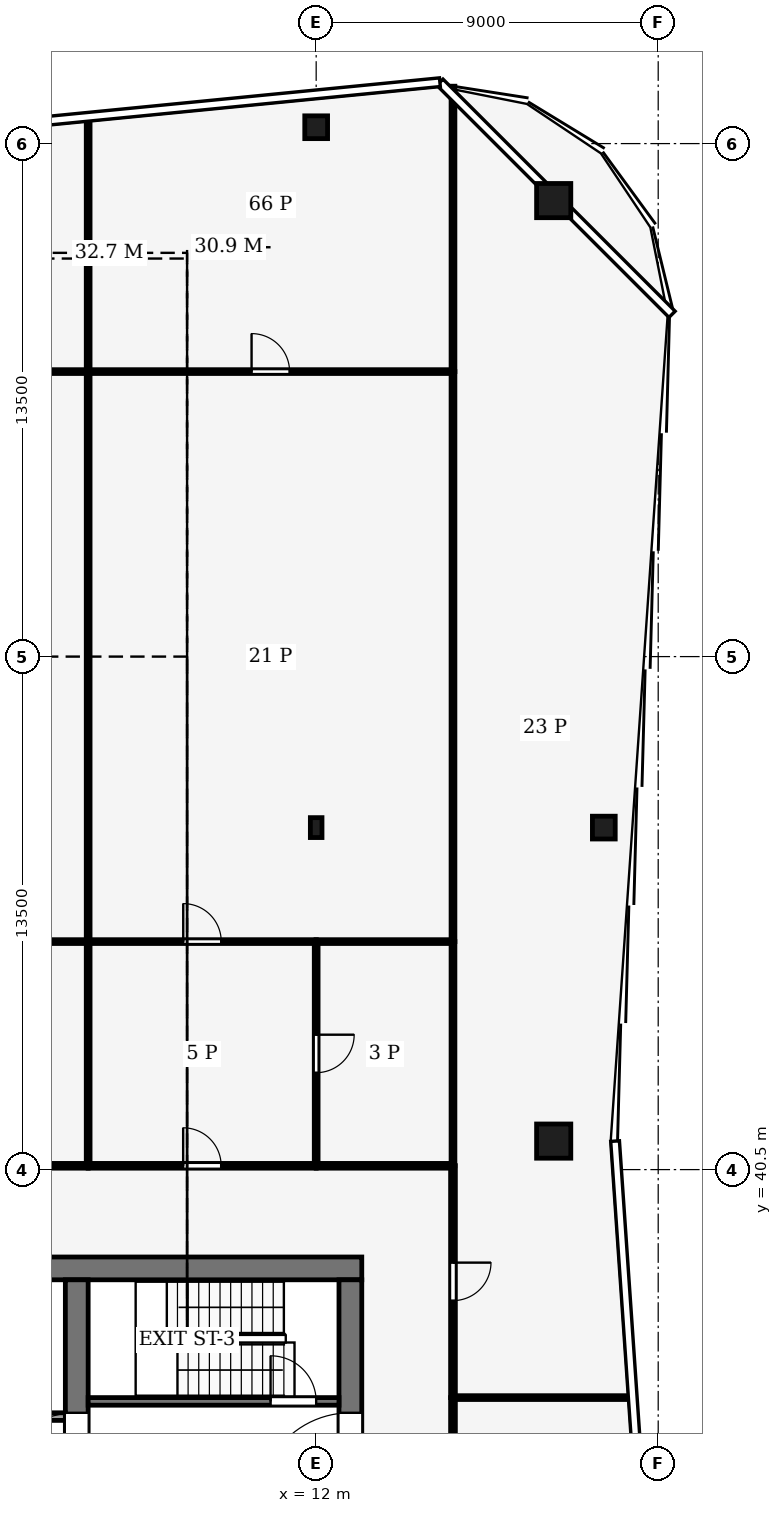
"""IFC4 building model, lengths in metres.
Left out: names, types, materials, properties, quantities, classifications, styles, units other than length and angle.
Written with IfcOpenShell. Run it as: python <this file> out.ifc"""

import sys

from ifc_helpers import new_model, si_unit, direction, frame, frame_2d, origin, origin_2d, place, context, subcontext, project, spatial, rectangle, hollow_rectangle, i_section, extrude, element, fill, save


model = new_model("IFC4")
c1 = context("Model", 3, precision=1e-05, world=origin(), true_north=direction((0.0, 1.0)))
c2 = subcontext(c1, "Body", "Model", "MODEL_VIEW")
j1 = project(units=[si_unit("LENGTHUNIT", "METRE"), si_unit("PLANEANGLEUNIT", "RADIAN")], contexts=[c1])
p1 = place(None, origin())
s1 = spatial("IfcSite", under=j1, at=p1, CompositionType="ELEMENT")
p2 = place(p1, origin())
s2 = spatial("IfcBuilding", under=s1, at=p2, CompositionType="ELEMENT")
p3 = place(p2, frame((0.0, 0.0, 314.0)))
s3 = spatial("IfcBuildingStorey", under=s2, at=p3, CompositionType="ELEMENT", Elevation=314.0)
p4 = place(p3, frame((-13.2, 37.9, -0.13), z_axis=(0.0, 0.0, 1.0), x_axis=(1.0, 0.0, 0.0)))
e1 = element("IfcWall", 1, at=p4, inside=s3, PredefinedType="SHEAR", context=c2, shape_type="SweptSolid", body=[
    extrude(rectangle(XDim=26.4, YDim=0.6, at=frame_2d((13.2, 0.0))), origin(), (0.0, 0.0, 1.0), 4.0),
])
p5 = place(p3, frame((12.9, 18.4, -0.13), z_axis=(0.0, 0.0, 1.0), x_axis=(0.0, 1.0, 0.0)))
e2 = element("IfcWall", 2, at=p5, inside=s3, PredefinedType="SHEAR", context=c2, shape_type="SweptSolid", body=[
    extrude(rectangle(XDim=19.2, YDim=0.6, at=frame_2d((9.6, 0.0))), origin(), (0.0, 0.0, 1.0), 4.0),
])
p6 = place(p5, frame((2.8, 0.0, 0.13)))
e3 = element("IfcOpeningElement", 3, at=p6, cuts=e2, PredefinedType="OPENING", context=c2, shape_type="SweptSolid", body=[
    extrude(rectangle(XDim=2.4, YDim=2.4, at=frame_2d((1.2, 1.2))), frame((0.0, 0.31, 0.0), z_axis=(0.0, -1.0, 0.0), x_axis=(1.0, 0.0, 0.0)), (0.0, 0.0, 1.0), 0.62),
])
p7 = place(p5, frame((13.3, 0.0, 0.13)))
e4 = element("IfcOpeningElement", 4, at=p7, cuts=e2, PredefinedType="OPENING", context=c2, shape_type="SweptSolid", body=[
    extrude(rectangle(XDim=2.4, YDim=2.4, at=frame_2d((1.2, 1.2))), frame((0.0, 0.31, 0.0), z_axis=(0.0, -1.0, 0.0), x_axis=(1.0, 0.0, 0.0)), (0.0, 0.0, 1.0), 0.62),
])
p8 = place(p3, frame((5.7, 18.4, -0.13), z_axis=(0.0, 0.0, 1.0), x_axis=(0.0, 1.0, 0.0)))
e5 = element("IfcWall", 5, at=p8, inside=s3, PredefinedType="SHEAR", context=c2, shape_type="SweptSolid", body=[
    extrude(rectangle(XDim=19.2, YDim=0.6, at=frame_2d((9.6, 0.0))), origin(), (0.0, 0.0, 1.0), 4.0),
])
p9 = place(p8, frame((8.35, 0.0, 0.13)))
e6 = element("IfcOpeningElement", 6, at=p9, cuts=e5, PredefinedType="OPENING", context=c2, shape_type="SweptSolid", body=[
    extrude(rectangle(XDim=0.9, YDim=2.1, at=frame_2d((0.45, 1.05))), frame((0.0, 0.31, 0.0), z_axis=(0.0, -1.0, 0.0), x_axis=(1.0, 0.0, 0.0)), (0.0, 0.0, 1.0), 0.62),
])
p10 = place(p8, frame((13.3, 0.0, 0.13)))
e7 = element("IfcOpeningElement", 7, at=p10, cuts=e5, PredefinedType="OPENING", context=c2, shape_type="SweptSolid", body=[
    extrude(rectangle(XDim=2.4, YDim=2.4, at=frame_2d((1.2, 1.2))), frame((0.0, 0.31, 0.0), z_axis=(0.0, -1.0, 0.0), x_axis=(1.0, 0.0, 0.0)), (0.0, 0.0, 1.0), 0.62),
])
for number, where, z_axis, x_axis in (
    (8, (18.25, 66.0, 0.0), (0.0, 0.0, 1.0), (1.0, 0.0, 0.0)),
    (9, (18.25, 41.25, 0.0), (0.0, 0.0, 1.0), (1.0, 0.0, 0.0)),
):
    element("IfcColumn", number, at=place(p3, frame(where, z_axis=z_axis, x_axis=x_axis)), inside=s3, PredefinedType="COLUMN", context=c2, shape_type="SweptSolid", body=[
        extrude(hollow_rectangle(XDim=0.9, YDim=0.9, WallThickness=0.04, at=origin_2d()), origin(), (0.0, 0.0, 1.0), 4.0),
    ])
for number, where, z_axis, x_axis in (
    (10, (12.0, 67.93, 0.0), (0.0, 0.0, 1.0), (1.0, 0.0, 0.0)),
    (11, (19.569, 49.5, 0.0), (0.0, 0.0, 1.0), (1.0, 0.0, 0.0)),
):
    element("IfcColumn", number, at=place(p3, frame(where, z_axis=z_axis, x_axis=x_axis)), inside=s3, PredefinedType="COLUMN", context=c2, shape_type="SweptSolid", body=[
        extrude(hollow_rectangle(XDim=0.6, YDim=0.6, WallThickness=0.025, at=origin_2d()), origin(), (0.0, 0.0, 1.0), 4.0),
    ])
p11 = place(p3, frame((12.0, 49.5, 0.0), z_axis=(0.0, 0.0, 1.0), x_axis=(1.0, 0.0, 0.0)))
e12 = element("IfcColumn", 12, at=p11, inside=s3, PredefinedType="COLUMN", context=c2, shape_type="SweptSolid", body=[
    extrude(i_section(OverallWidth=0.306, OverallDepth=0.524, WebThickness=0.012, FlangeThickness=0.04, FilletRadius=0.027, at=origin_2d()), origin(), (0.0, 0.0, 1.0), 4.0),
])
p12 = place(p3, frame((-5.4, 34.0, 0.0), z_axis=(0.0, 0.0, 1.0), x_axis=(1.0, 0.0, 0.0)))
e13 = element("IfcWall", 13, at=p12, inside=s3, PredefinedType="PARTITIONING", context=c2, shape_type="SweptSolid", body=[
    extrude(rectangle(XDim=10.8, YDim=0.2, at=frame_2d((5.4, 0.0))), origin(), (0.0, 0.0, 1.0), 3.87),
])
p13 = place(p12, frame((6.15, 0.0, 0.0)))
e14 = element("IfcOpeningElement", 14, at=p13, cuts=e13, PredefinedType="OPENING", context=c2, shape_type="SweptSolid", body=[
    extrude(rectangle(XDim=1.2, YDim=2.2, at=frame_2d((0.6, 1.1))), frame((0.0, 0.11, 0.0), z_axis=(0.0, -1.0, 0.0), x_axis=(1.0, 0.0, 0.0)), (0.0, 0.0, 1.0), 0.22),
])
p14 = place(p12, frame((8.95, 0.0, 0.0)))
e15 = element("IfcOpeningElement", 15, at=p14, cuts=e13, PredefinedType="OPENING", context=c2, shape_type="SweptSolid", body=[
    extrude(rectangle(XDim=1.0, YDim=2.1, at=frame_2d((0.5, 1.05))), frame((0.0, 0.11, 0.0), z_axis=(0.0, -1.0, 0.0), x_axis=(1.0, 0.0, 0.0)), (0.0, 0.0, 1.0), 0.22),
])
p15 = place(p3, frame((6.0, 34.4, 0.0), z_axis=(0.0, 0.0, 1.0), x_axis=(1.0, 0.0, 0.0)))
e16 = element("IfcWall", 16, at=p15, inside=s3, PredefinedType="PARTITIONING", context=c2, shape_type="SweptSolid", body=[
    extrude(rectangle(XDim=6.6, YDim=0.2, at=frame_2d((3.3, 0.0))), origin(), (0.0, 0.0, 1.0), 3.87),
])
p16 = place(p15, frame((4.8, 0.0, 0.0)))
e17 = element("IfcOpeningElement", 17, at=p16, cuts=e16, PredefinedType="OPENING", context=c2, shape_type="SweptSolid", body=[
    extrude(rectangle(XDim=1.2, YDim=2.2, at=frame_2d((0.6, 1.1))), frame((0.0, 0.11, 0.0), z_axis=(0.0, -1.0, 0.0), x_axis=(1.0, 0.0, 0.0)), (0.0, 0.0, 1.0), 0.22),
])
p17 = place(p3, frame((15.6, 34.5, 0.0), z_axis=(0.0, 0.0, 1.0), x_axis=(0.0, -1.0, 0.0)))
e18 = element("IfcWall", 18, at=p17, inside=s3, PredefinedType="PARTITIONING", context=c2, shape_type="SweptSolid", body=[
    extrude(rectangle(XDim=3.0, YDim=0.125, at=frame_2d((1.5, 0.0))), origin(), (0.0, 0.0, 1.0), 3.54),
])
p18 = place(p17, frame((1.05, 0.0, 0.0)))
e19 = element("IfcOpeningElement", 19, at=p18, cuts=e18, PredefinedType="OPENING", context=c2, shape_type="SweptSolid", body=[
    extrude(rectangle(XDim=0.9, YDim=2.1, at=frame_2d((0.45, 1.05))), frame((0.0, 0.073, 0.0), z_axis=(0.0, -1.0, 0.0), x_axis=(1.0, 0.0, 0.0)), (0.0, 0.0, 1.0), 0.145),
])
p19 = place(p3, frame((15.6, 40.604, 0.0), z_axis=(0.0, 0.0, 1.0), x_axis=(0.0, -1.0, 0.0)))
e20 = element("IfcWall", 20, at=p19, inside=s3, PredefinedType="PARTITIONING", context=c2, shape_type="SweptSolid", body=[
    extrude(rectangle(XDim=6.104, YDim=0.125, at=frame_2d((3.052, 0.0))), origin(), (0.0, 0.0, 1.0), 3.14),
])
p20 = place(p19, frame((2.552, 0.0, 0.0)))
e21 = element("IfcOpeningElement", 21, at=p20, cuts=e20, PredefinedType="OPENING", context=c2, shape_type="SweptSolid", body=[
    extrude(rectangle(XDim=1.0, YDim=2.1, at=frame_2d((0.5, 1.05))), frame((0.0, 0.073, 0.0), z_axis=(0.0, -1.0, 0.0), x_axis=(1.0, 0.0, 0.0)), (0.0, 0.0, 1.0), 0.145),
])
p21 = place(p3, frame((-3.0, 40.6, 0.0), z_axis=(0.0, 0.0, 1.0), x_axis=(1.0, 0.0, 0.0)))
e22 = element("IfcWall", 22, at=p21, inside=s3, PredefinedType="PARTITIONING", context=c2, shape_type="SweptSolid", body=[
    extrude(rectangle(XDim=9.0, YDim=0.125, at=frame_2d((4.5, 0.0))), origin(), (0.0, 0.0, 1.0), 3.39),
])
p22 = place(p21, frame((4.0, 0.0, 0.0)))
e23 = element("IfcOpeningElement", 23, at=p22, cuts=e22, PredefinedType="OPENING", context=c2, shape_type="SweptSolid", body=[
    extrude(rectangle(XDim=1.0, YDim=2.1, at=frame_2d((0.5, 1.05))), frame((0.0, 0.073, 0.0), z_axis=(0.0, -1.0, 0.0), x_axis=(1.0, 0.0, 0.0)), (0.0, 0.0, 1.0), 0.145),
])
p23 = place(p3, frame((6.0, 40.6, 0.0), z_axis=(0.0, 0.0, 1.0), x_axis=(1.0, 0.0, 0.0)))
e24 = element("IfcWall", 24, at=p23, inside=s3, PredefinedType="PARTITIONING", context=c2, shape_type="SweptSolid", body=[
    extrude(rectangle(XDim=6.0, YDim=0.125, at=frame_2d((3.0, 0.0))), origin(), (0.0, 0.0, 1.0), 3.39),
])
p24 = place(p23, frame((2.5, 0.0, 0.0)))
e25 = element("IfcOpeningElement", 25, at=p24, cuts=e24, PredefinedType="OPENING", context=c2, shape_type="SweptSolid", body=[
    extrude(rectangle(XDim=1.0, YDim=2.1, at=frame_2d((0.5, 1.05))), frame((0.0, 0.073, 0.0), z_axis=(0.0, -1.0, 0.0), x_axis=(1.0, 0.0, 0.0)), (0.0, 0.0, 1.0), 0.145),
])
p25 = place(p3, frame((15.6, 40.6, 0.0), z_axis=(0.0, 0.0, 1.0), x_axis=(-1.0, 0.0, 0.0)))
e26 = element("IfcWall", 26, at=p25, inside=s3, PredefinedType="PARTITIONING", context=c2, shape_type="SweptSolid", body=[
    extrude(rectangle(XDim=3.6, YDim=0.125, at=frame_2d((1.8, 0.0))), origin(), (0.0, 0.0, 1.0), 3.39),
])
p26 = place(p3, frame((20.295, 34.5, 0.0), z_axis=(0.0, 0.0, 1.0), x_axis=(-1.0, 0.0, 0.0)))
e27 = element("IfcWall", 27, at=p26, inside=s3, PredefinedType="PARTITIONING", context=c2, shape_type="SweptSolid", body=[
    extrude(rectangle(XDim=4.695, YDim=0.1, at=frame_2d((2.348, 0.0))), origin(), (0.0, 0.0, 1.0), 3.04),
])
p27 = place(p3, frame((15.6, 46.5, 0.0), z_axis=(0.0, 0.0, 1.0), x_axis=(0.0, -1.0, 0.0)))
e28 = element("IfcWall", 28, at=p27, inside=s3, PredefinedType="PARTITIONING", context=c2, shape_type="SweptSolid", body=[
    extrude(rectangle(XDim=5.9, YDim=0.1, at=frame_2d((2.95, 0.0))), origin(), (0.0, 0.0, 1.0), 3.87),
])
p28 = place(p3, frame((15.6, 61.5, 0.0), z_axis=(0.0, 0.0, 1.0), x_axis=(0.0, -1.0, 0.0)))
e29 = element("IfcWall", 29, at=p28, inside=s3, PredefinedType="PARTITIONING", context=c2, shape_type="SweptSolid", body=[
    extrude(rectangle(XDim=15.0, YDim=0.1, at=frame_2d((7.5, 0.0))), origin(), (0.0, 0.0, 1.0), 3.35),
])
p29 = place(p3, frame((15.6, 69.01, 0.0), z_axis=(0.0, 0.0, 1.0), x_axis=(0.0, -1.0, 0.0)))
e30 = element("IfcWall", 30, at=p29, inside=s3, PredefinedType="PARTITIONING", context=c2, shape_type="SweptSolid", body=[
    extrude(rectangle(XDim=7.51, YDim=0.1, at=frame_2d((3.755, 0.0))), origin(), (0.0, 0.0, 1.0), 2.93),
])
p30 = place(p3, frame((6.0, 46.5, 0.0), z_axis=(0.0, 0.0, 1.0), x_axis=(-1.0, 0.0, 0.0)))
e31 = element("IfcWall", 31, at=p30, inside=s3, PredefinedType="PARTITIONING", context=c2, shape_type="SweptSolid", body=[
    extrude(rectangle(XDim=9.004, YDim=0.1, at=frame_2d((4.502, 0.0))), origin(), (0.0, 0.0, 1.0), 3.39),
])
p31 = place(p3, frame((6.0, 40.6, 0.0), z_axis=(0.0, 0.0, 1.0), x_axis=(0.0, 1.0, 0.0)))
e32 = element("IfcWall", 32, at=p31, inside=s3, PredefinedType="PARTITIONING", context=c2, shape_type="SweptSolid", body=[
    extrude(rectangle(XDim=5.9, YDim=0.1, at=frame_2d((2.95, 0.0))), origin(), (0.0, 0.0, 1.0), 3.87),
])
p32 = place(p3, frame((3.0, 61.5, 0.0), z_axis=(0.0, 0.0, 1.0), x_axis=(1.0, 0.0, 0.0)))
e33 = element("IfcWall", 33, at=p32, inside=s3, PredefinedType="PARTITIONING", context=c2, shape_type="SweptSolid", body=[
    extrude(rectangle(XDim=3.0, YDim=0.1, at=frame_2d((1.5, 0.0))), origin(), (0.0, 0.0, 1.0), 3.24),
])
p33 = place(p32, frame((1.0, 0.0, 0.0)))
e34 = element("IfcOpeningElement", 34, at=p33, cuts=e33, PredefinedType="OPENING", context=c2, shape_type="SweptSolid", body=[
    extrude(rectangle(XDim=1.0, YDim=2.1, at=frame_2d((0.5, 1.05))), frame((0.0, 0.06, 0.0), z_axis=(0.0, -1.0, 0.0), x_axis=(1.0, 0.0, 0.0)), (0.0, 0.0, 1.0), 0.12),
])
p34 = place(p3, frame((6.0, 46.5, 0.0), z_axis=(0.0, 0.0, 1.0), x_axis=(0.0, 1.0, 0.0)))
e35 = element("IfcWall", 35, at=p34, inside=s3, PredefinedType="PARTITIONING", context=c2, shape_type="SweptSolid", body=[
    extrude(rectangle(XDim=15.0, YDim=0.1, at=frame_2d((7.5, 0.0))), origin(), (0.0, 0.0, 1.0), 3.24),
])
p35 = place(p3, frame((6.0, 61.5, 0.0), z_axis=(0.0, 0.0, 1.0), x_axis=(0.0, 1.0, 0.0)))
e36 = element("IfcWall", 36, at=p35, inside=s3, PredefinedType="PARTITIONING", context=c2, shape_type="SweptSolid", body=[
    extrude(rectangle(XDim=6.67, YDim=0.1, at=frame_2d((3.335, 0.0))), origin(), (0.0, 0.0, 1.0), 3.04),
])
p36 = place(p3, frame((12.0, 46.5, 0.0), z_axis=(0.0, 0.0, 1.0), x_axis=(0.0, -1.0, 0.0)))
e37 = element("IfcWall", 37, at=p36, inside=s3, PredefinedType="PARTITIONING", context=c2, shape_type="SweptSolid", body=[
    extrude(rectangle(XDim=5.9, YDim=0.1, at=frame_2d((2.95, 0.0))), origin(), (0.0, 0.0, 1.0), 3.39),
])
p37 = place(p36, frame((2.45, 0.0, 0.0)))
e38 = element("IfcOpeningElement", 38, at=p37, cuts=e37, PredefinedType="OPENING", context=c2, shape_type="SweptSolid", body=[
    extrude(rectangle(XDim=1.0, YDim=2.1, at=frame_2d((0.5, 1.05))), frame((0.0, 0.06, 0.0), z_axis=(0.0, -1.0, 0.0), x_axis=(1.0, 0.0, 0.0)), (0.0, 0.0, 1.0), 0.12),
])
p38 = place(p3, frame((6.0, 46.5, 0.0), z_axis=(0.0, 0.0, 1.0), x_axis=(1.0, 0.0, 0.0)))
e39 = element("IfcWall", 39, at=p38, inside=s3, PredefinedType="PARTITIONING", context=c2, shape_type="SweptSolid", body=[
    extrude(rectangle(XDim=6.004, YDim=0.1, at=frame_2d((3.002, 0.0))), origin(), (0.0, 0.0, 1.0), 3.39),
])
p39 = place(p38, frame((2.502, 0.0, 0.0)))
e40 = element("IfcOpeningElement", 40, at=p39, cuts=e39, PredefinedType="OPENING", context=c2, shape_type="SweptSolid", body=[
    extrude(rectangle(XDim=1.0, YDim=2.1, at=frame_2d((0.5, 1.05))), frame((0.0, 0.06, 0.0), z_axis=(0.0, -1.0, 0.0), x_axis=(1.0, 0.0, 0.0)), (0.0, 0.0, 1.0), 0.12),
])
p40 = place(p3, frame((15.6, 46.5, 0.0), z_axis=(0.0, 0.0, 1.0), x_axis=(-1.0, 0.0, 0.0)))
e41 = element("IfcWall", 41, at=p40, inside=s3, PredefinedType="PARTITIONING", context=c2, shape_type="SweptSolid", body=[
    extrude(rectangle(XDim=3.604, YDim=0.1, at=frame_2d((1.802, 0.0))), origin(), (0.0, 0.0, 1.0), 3.87),
])
p41 = place(p3, frame((6.0, 61.5, 0.0), z_axis=(0.0, 0.0, 1.0), x_axis=(1.0, 0.0, 0.0)))
e42 = element("IfcWall", 42, at=p41, inside=s3, PredefinedType="PARTITIONING", context=c2, shape_type="SweptSolid", body=[
    extrude(rectangle(XDim=9.6, YDim=0.1, at=frame_2d((4.8, 0.0))), origin(), (0.0, 0.0, 1.0), 3.24),
])
p42 = place(p41, frame((4.3, 0.0, 0.0)))
e43 = element("IfcOpeningElement", 43, at=p42, cuts=e42, PredefinedType="OPENING", context=c2, shape_type="SweptSolid", body=[
    extrude(rectangle(XDim=1.0, YDim=2.1, at=frame_2d((0.5, 1.05))), frame((0.0, 0.06, 0.0), z_axis=(0.0, -1.0, 0.0), x_axis=(1.0, 0.0, 0.0)), (0.0, 0.0, 1.0), 0.12),
])
p43 = place(p16, origin())
e44 = element("IfcDoor", 44, at=p43, inside=s3, OperationType="SINGLE_SWING_RIGHT", PredefinedType="DOOR", context=c2, shape_type="SweptSolid", body=[
    extrude(rectangle(XDim=1.2, YDim=2.2, at=frame_2d((0.6, 1.1))), frame((0.0, 0.025, 0.0), z_axis=(0.0, -1.0, 0.0), x_axis=(1.0, 0.0, 0.0)), (0.0, 0.0, 1.0), 0.05),
])
fill(e17, e44)
p44 = place(p10, origin())
e45 = element("IfcDoor", 45, at=p44, inside=s3, OperationType="DOUBLE_DOOR_SINGLE_SWING", PredefinedType="DOOR", context=c2, shape_type="SweptSolid", body=[
    extrude(rectangle(XDim=2.4, YDim=2.4, at=frame_2d((1.2, 1.2))), frame((0.0, 0.025, 0.0), z_axis=(0.0, -1.0, 0.0), x_axis=(1.0, 0.0, 0.0)), (0.0, 0.0, 1.0), 0.05),
])
fill(e7, e45)
p45 = place(p7, origin())
e46 = element("IfcDoor", 46, at=p45, inside=s3, OperationType="DOUBLE_DOOR_SINGLE_SWING", PredefinedType="DOOR", context=c2, shape_type="SweptSolid", body=[
    extrude(rectangle(XDim=2.4, YDim=2.4, at=frame_2d((1.2, 1.2))), frame((0.0, 0.025, 0.0), z_axis=(0.0, -1.0, 0.0), x_axis=(1.0, 0.0, 0.0)), (0.0, 0.0, 1.0), 0.05),
])
fill(e4, e46)
p46 = place(p20, origin())
e47 = element("IfcDoor", 47, at=p46, inside=s3, OperationType="SINGLE_SWING_LEFT", PredefinedType="DOOR", context=c2, shape_type="SweptSolid", body=[
    extrude(rectangle(XDim=1.0, YDim=2.1, at=frame_2d((0.5, 1.05))), frame((0.0, 0.025, 0.0), z_axis=(0.0, -1.0, 0.0), x_axis=(1.0, 0.0, 0.0)), (0.0, 0.0, 1.0), 0.05),
])
fill(e21, e47)
p47 = place(p24, origin())
e48 = element("IfcDoor", 48, at=p47, inside=s3, OperationType="SINGLE_SWING_RIGHT", PredefinedType="DOOR", context=c2, shape_type="SweptSolid", body=[
    extrude(rectangle(XDim=1.0, YDim=2.1, at=frame_2d((0.5, 1.05))), frame((0.0, 0.025, 0.0), z_axis=(0.0, -1.0, 0.0), x_axis=(1.0, 0.0, 0.0)), (0.0, 0.0, 1.0), 0.05),
])
fill(e25, e48)
p48 = place(p37, origin())
e49 = element("IfcDoor", 49, at=p48, inside=s3, OperationType="SINGLE_SWING_LEFT", PredefinedType="DOOR", context=c2, shape_type="SweptSolid", body=[
    extrude(rectangle(XDim=1.0, YDim=2.1, at=frame_2d((0.5, 1.05))), frame((0.0, 0.025, 0.0), z_axis=(0.0, -1.0, 0.0), x_axis=(1.0, 0.0, 0.0)), (0.0, 0.0, 1.0), 0.05),
])
fill(e38, e49)
p49 = place(p39, origin())
e50 = element("IfcDoor", 50, at=p49, inside=s3, OperationType="SINGLE_SWING_RIGHT", PredefinedType="DOOR", context=c2, shape_type="SweptSolid", body=[
    extrude(rectangle(XDim=1.0, YDim=2.1, at=frame_2d((0.5, 1.05))), frame((0.0, 0.025, 0.0), z_axis=(0.0, -1.0, 0.0), x_axis=(1.0, 0.0, 0.0)), (0.0, 0.0, 1.0), 0.05),
])
fill(e40, e50)
p50 = place(p42, origin())
e51 = element("IfcDoor", 51, at=p50, inside=s3, OperationType="SINGLE_SWING_LEFT", PredefinedType="DOOR", context=c2, shape_type="SweptSolid", body=[
    extrude(rectangle(XDim=1.0, YDim=2.1, at=frame_2d((0.5, 1.05))), frame((0.0, 0.025, 0.0), z_axis=(0.0, -1.0, 0.0), x_axis=(1.0, 0.0, 0.0)), (0.0, 0.0, 1.0), 0.05),
])
fill(e43, e51)
save(model, sys.argv[1])
